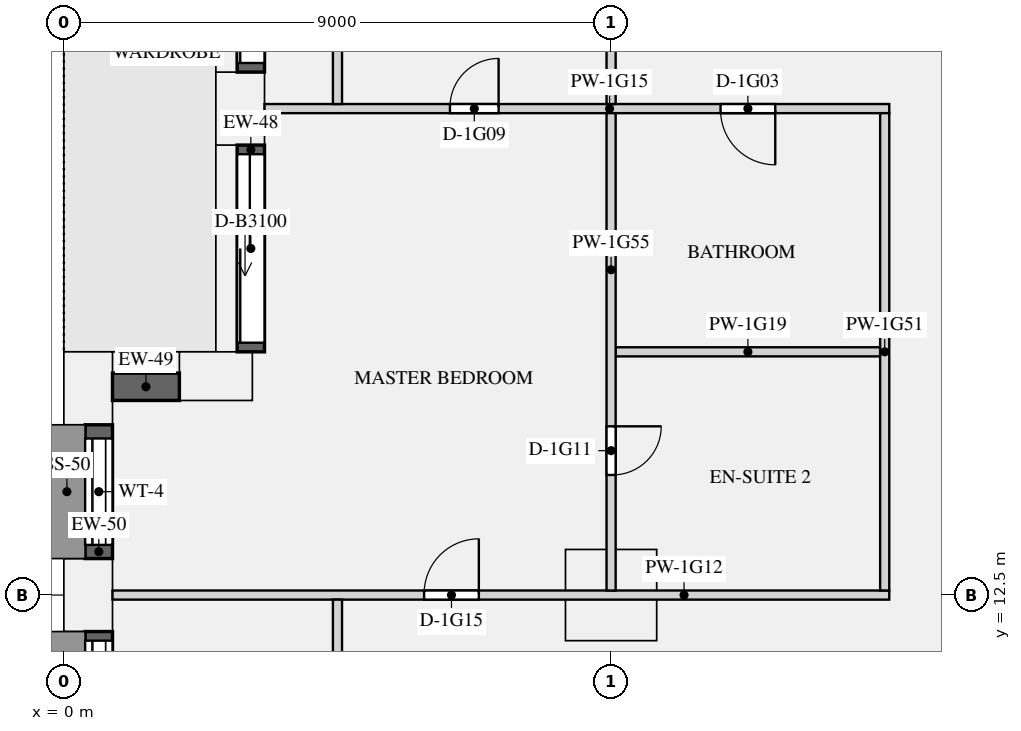
"""IFC4 building model, lengths in metres.
Left out: names, types, materials, properties, quantities, classifications, styles, units other than length and angle.
Written with IfcOpenShell. Run it as: python <this file> out.ifc"""

import sys

from ifc_helpers import new_model, si_unit, direction, frame, frame_2d, origin, origin_2d, place, context, subcontext, project, spatial, rectangle, extrude, element, fill, save


model = new_model("IFC4")
c1 = context("Model", 3, precision=1e-05, world=origin(), true_north=direction((0.0, 1.0)))
c2 = subcontext(c1, "Body", "Model", "MODEL_VIEW")
j1 = project(units=[si_unit("LENGTHUNIT", "METRE"), si_unit("PLANEANGLEUNIT", "RADIAN")], contexts=[c1])
p1 = place(None, origin())
s1 = spatial("IfcSite", under=j1, at=p1, CompositionType="ELEMENT")
p2 = place(p1, origin())
s2 = spatial("IfcBuilding", under=s1, at=p2, CompositionType="ELEMENT")
p3 = place(p2, frame((0.0, 0.0, 66.75)))
s3 = spatial("IfcBuildingStorey", under=s2, at=p3, CompositionType="ELEMENT", Elevation=66.75)
for number, where, z_axis, x_axis in (
    (1, (2.9, 20.5, 0.0), (0.0, 0.0, 1.0), (0.0, -1.0, 0.0)),
    (2, (2.5, 16.1, 0.0), (0.0, 0.0, 1.0), (-1.0, 0.0, 0.0)),
    (3, (0.4, 15.9, 0.0), (0.0, 0.0, 1.0), (0.0, -1.0, 0.0)),
    (4, (0.4, 12.5, 0.0), (0.0, 0.0, 1.0), (0.0, -1.0, 0.0)),
):
    element("IfcColumn", number, at=place(p3, frame(where, z_axis=z_axis, x_axis=x_axis)), inside=s3, PredefinedType="USERDEFINED", context=c2, shape_type="SweptSolid", body=[
        extrude(rectangle(XDim=1.2, YDim=0.8, at=origin_2d()), origin(), (0.0, 0.0, 1.0), 3.15),
    ])
p4 = place(p3, frame((9.0, 12.5, 0.0), z_axis=(0.0, 0.0, 1.0), x_axis=(1.0, 0.0, 0.0)))
e5 = element("IfcColumn", 5, at=p4, inside=s3, PredefinedType="COLUMN", context=c2, shape_type="SweptSolid", body=[
    extrude(rectangle(XDim=1.5, YDim=1.5, at=origin_2d()), origin(), (0.0, 0.0, 1.0), 3.15),
])
p5 = place(p3, frame((3.075, 23.9, 0.0), z_axis=(0.0, 0.0, 1.0), x_axis=(0.0, -1.0, 0.0)))
e6 = element("IfcWall", 6, at=p5, inside=s3, PredefinedType="SOLIDWALL", context=c2, shape_type="SweptSolid", body=[
    extrude(rectangle(XDim=2.8, YDim=0.45, at=frame_2d((1.4, 0.0))), origin(), (0.0, 0.0, 1.0), 2.83),
])
p6 = place(p5, frame((0.15, 0.0, 0.0)))
e7 = element("IfcOpeningElement", 7, at=p6, cuts=e6, PredefinedType="OPENING", context=c2, shape_type="SweptSolid", body=[
    extrude(rectangle(XDim=2.5, YDim=2.3, at=frame_2d((1.25, 1.15))), frame((0.0, 0.235, 0.0), z_axis=(0.0, -1.0, 0.0), x_axis=(1.0, 0.0, 0.0)), (0.0, 0.0, 1.0), 0.47),
])
p7 = place(p3, frame((3.075, 19.9, 0.0), z_axis=(0.0, 0.0, 1.0), x_axis=(0.0, -1.0, 0.0)))
e8 = element("IfcWall", 8, at=p7, inside=s3, PredefinedType="SOLIDWALL", context=c2, shape_type="SweptSolid", body=[
    extrude(rectangle(XDim=3.4, YDim=0.45, at=frame_2d((1.7, 0.0))), origin(), (0.0, 0.0, 1.0), 2.83),
])
p8 = place(p7, frame((0.15, 0.0, 0.0)))
e9 = element("IfcOpeningElement", 9, at=p8, cuts=e8, PredefinedType="OPENING", context=c2, shape_type="SweptSolid", body=[
    extrude(rectangle(XDim=3.1, YDim=2.3, at=frame_2d((1.55, 1.15))), frame((0.0, 0.235, 0.0), z_axis=(0.0, -1.0, 0.0), x_axis=(1.0, 0.0, 0.0)), (0.0, 0.0, 1.0), 0.47),
])
p9 = place(p3, frame((1.9, 15.925, 0.9), z_axis=(0.0, 0.0, 1.0), x_axis=(-1.0, 0.0, 0.0)))
e10 = element("IfcWall", 10, at=p9, inside=s3, PredefinedType="SOLIDWALL", context=c2, shape_type="SweptSolid", body=[
    extrude(rectangle(XDim=1.1, YDim=0.45, at=frame_2d((0.55, 0.0))), origin(), (0.0, 0.0, 1.0), 1.93),
])
p10 = place(p3, frame((0.575, 15.3, 0.9), z_axis=(0.0, 0.0, 1.0), x_axis=(0.0, -1.0, 0.0)))
e11 = element("IfcWall", 11, at=p10, inside=s3, PredefinedType="SOLIDWALL", context=c2, shape_type="SweptSolid", body=[
    extrude(rectangle(XDim=2.2, YDim=0.45, at=frame_2d((1.1, 0.0))), origin(), (0.0, 0.0, 1.0), 1.93),
])
p11 = place(p10, frame((0.225, 0.0, 0.15)))
e12 = element("IfcOpeningElement", 12, at=p11, cuts=e11, PredefinedType="OPENING", context=c2, shape_type="SweptSolid", body=[
    extrude(rectangle(XDim=1.75, YDim=1.5, at=frame_2d((0.875, 0.75))), frame((0.0, 0.235, 0.0), z_axis=(0.0, -1.0, 0.0), x_axis=(1.0, 0.0, 0.0)), (0.0, 0.0, 1.0), 0.47),
])
p12 = place(p3, frame((0.575, 11.9, 0.9), z_axis=(0.0, 0.0, 1.0), x_axis=(0.0, -1.0, 0.0)))
e13 = element("IfcWall", 13, at=p12, inside=s3, PredefinedType="SOLIDWALL", context=c2, shape_type="SweptSolid", body=[
    extrude(rectangle(XDim=2.8, YDim=0.45, at=frame_2d((1.4, 0.0))), origin(), (0.0, 0.0, 1.0), 1.93),
])
p13 = place(p12, frame((0.15, 0.0, 0.15)))
e14 = element("IfcOpeningElement", 14, at=p13, cuts=e13, PredefinedType="OPENING", context=c2, shape_type="SweptSolid", body=[
    extrude(rectangle(XDim=2.5, YDim=1.5, at=frame_2d((1.25, 0.75))), frame((0.0, 0.235, 0.0), z_axis=(0.0, -1.0, 0.0), x_axis=(1.0, 0.0, 0.0)), (0.0, 0.0, 1.0), 0.47),
])
p14 = place(p3, frame((0.8, 12.5, 0.0), z_axis=(0.0, 0.0, 1.0), x_axis=(1.0, 0.0, 0.0)))
e15 = element("IfcWall", 15, at=p14, inside=s3, PredefinedType="PARTITIONING", context=c2, shape_type="SweptSolid", body=[
    extrude(rectangle(XDim=12.775, YDim=0.15, at=frame_2d((6.387, 0.0))), origin(), (0.0, 0.0, 1.0), 2.83),
])
p15 = place(p14, frame((5.125, 0.0, 0.0)))
e16 = element("IfcOpeningElement", 16, at=p15, cuts=e15, PredefinedType="OPENING", context=c2, shape_type="SweptSolid", body=[
    extrude(rectangle(XDim=0.9, YDim=2.1, at=frame_2d((0.45, 1.05))), frame((0.0, 0.085, 0.0), z_axis=(0.0, -1.0, 0.0), x_axis=(1.0, 0.0, 0.0)), (0.0, 0.0, 1.0), 0.17),
])
p16 = place(p3, frame((3.3, 20.5, 0.0), z_axis=(0.0, 0.0, 1.0), x_axis=(1.0, 0.0, 0.0)))
e17 = element("IfcWall", 17, at=p16, inside=s3, PredefinedType="PARTITIONING", context=c2, shape_type="SweptSolid", body=[
    extrude(rectangle(XDim=10.275, YDim=0.15, at=frame_2d((5.137, 0.0))), origin(), (0.0, 0.0, 1.0), 2.83),
])
p17 = place(p16, frame((7.5, 0.0, 0.0)))
e18 = element("IfcOpeningElement", 18, at=p17, cuts=e17, PredefinedType="OPENING", context=c2, shape_type="SweptSolid", body=[
    extrude(rectangle(XDim=0.9, YDim=2.1, at=frame_2d((0.45, 1.05))), frame((0.0, 0.085, 0.0), z_axis=(0.0, -1.0, 0.0), x_axis=(1.0, 0.0, 0.0)), (0.0, 0.0, 1.0), 0.17),
])
p18 = place(p16, frame((3.05, 0.0, 0.0)))
e19 = element("IfcOpeningElement", 19, at=p18, cuts=e17, PredefinedType="OPENING", context=c2, shape_type="SweptSolid", body=[
    extrude(rectangle(XDim=0.8, YDim=2.1, at=frame_2d((0.4, 1.05))), frame((0.0, 0.085, 0.0), z_axis=(0.0, -1.0, 0.0), x_axis=(1.0, 0.0, 0.0)), (0.0, 0.0, 1.0), 0.17),
])
p19 = place(p3, frame((9.075, 16.5, 0.0), z_axis=(0.0, 0.0, 1.0), x_axis=(1.0, 0.0, 0.0)))
e20 = element("IfcWall", 20, at=p19, inside=s3, PredefinedType="PARTITIONING", context=c2, shape_type="SweptSolid", body=[
    extrude(rectangle(XDim=4.35, YDim=0.15, at=frame_2d((2.175, 0.0))), origin(), (0.0, 0.0, 1.0), 2.83),
])
p20 = place(p3, frame((13.5, 12.575, 0.0), z_axis=(0.0, 0.0, 1.0), x_axis=(0.0, 1.0, 0.0)))
e21 = element("IfcWall", 21, at=p20, inside=s3, PredefinedType="PARTITIONING", context=c2, shape_type="SweptSolid", body=[
    extrude(rectangle(XDim=7.85, YDim=0.15, at=frame_2d((3.925, 0.0))), origin(), (0.0, 0.0, 1.0), 2.83),
])
p21 = place(p3, frame((4.5, 5.3, 0.0), z_axis=(0.0, 0.0, 1.0), x_axis=(0.0, 1.0, 0.0)))
e22 = element("IfcWall", 22, at=p21, inside=s3, PredefinedType="PARTITIONING", context=c2, shape_type="SweptSolid", body=[
    extrude(rectangle(XDim=7.125, YDim=0.15, at=frame_2d((3.562, 0.0))), origin(), (0.0, 0.0, 1.0), 2.83),
])
p22 = place(p21, frame((4.75, 0.0, 0.0)))
e23 = element("IfcOpeningElement", 23, at=p22, cuts=e22, PredefinedType="OPENING", context=c2, shape_type="SweptSolid", body=[
    extrude(rectangle(XDim=0.9, YDim=2.1, at=frame_2d((0.45, 1.05))), frame((0.0, 0.085, 0.0), z_axis=(0.0, -1.0, 0.0), x_axis=(1.0, 0.0, 0.0)), (0.0, 0.0, 1.0), 0.17),
])
p23 = place(p21, frame((0.775, 0.0, 0.0)))
e24 = element("IfcOpeningElement", 24, at=p23, cuts=e22, PredefinedType="OPENING", context=c2, shape_type="SweptSolid", body=[
    extrude(rectangle(XDim=1.5, YDim=2.1, at=frame_2d((0.75, 1.05))), frame((0.0, 0.085, 0.0), z_axis=(0.0, -1.0, 0.0), x_axis=(1.0, 0.0, 0.0)), (0.0, 0.0, 1.0), 0.17),
])
p24 = place(p3, frame((4.5, 20.575, 0.0), z_axis=(0.0, 0.0, 1.0), x_axis=(0.0, 1.0, 0.0)))
e25 = element("IfcWall", 25, at=p24, inside=s3, PredefinedType="PARTITIONING", context=c2, shape_type="SweptSolid", body=[
    extrude(rectangle(XDim=3.35, YDim=0.15, at=frame_2d((1.675, 0.0))), origin(), (0.0, 0.0, 1.0), 2.83),
])
p25 = place(p24, frame((1.275, 0.0, 0.0)))
e26 = element("IfcOpeningElement", 26, at=p25, cuts=e25, PredefinedType="OPENING", context=c2, shape_type="SweptSolid", body=[
    extrude(rectangle(XDim=0.8, YDim=2.1, at=frame_2d((0.4, 1.05))), frame((0.0, 0.085, 0.0), z_axis=(0.0, -1.0, 0.0), x_axis=(1.0, 0.0, 0.0)), (0.0, 0.0, 1.0), 0.17),
])
p26 = place(p3, frame((9.0, 12.575, 0.0), z_axis=(0.0, 0.0, 1.0), x_axis=(0.0, 1.0, 0.0)))
e27 = element("IfcWall", 27, at=p26, inside=s3, PredefinedType="PARTITIONING", context=c2, shape_type="SweptSolid", body=[
    extrude(rectangle(XDim=7.85, YDim=0.15, at=frame_2d((3.925, 0.0))), origin(), (0.0, 0.0, 1.0), 2.83),
])
p27 = place(p26, frame((1.9, 0.0, 0.0)))
e28 = element("IfcOpeningElement", 28, at=p27, cuts=e27, PredefinedType="OPENING", context=c2, shape_type="SweptSolid", body=[
    extrude(rectangle(XDim=0.8, YDim=2.1, at=frame_2d((0.4, 1.05))), frame((0.0, 0.085, 0.0), z_axis=(0.0, -1.0, 0.0), x_axis=(1.0, 0.0, 0.0)), (0.0, 0.0, 1.0), 0.17),
])
p28 = place(p3, frame((9.0, 20.575, 0.0), z_axis=(0.0, 0.0, 1.0), x_axis=(0.0, 1.0, 0.0)))
e29 = element("IfcWall", 29, at=p28, inside=s3, PredefinedType="PARTITIONING", context=c2, shape_type="SweptSolid", body=[
    extrude(rectangle(XDim=11.725, YDim=0.15, at=frame_2d((5.863, 0.0))), origin(), (0.0, 0.0, 1.0), 2.83),
])
p29 = place(p28, frame((5.6, 0.0, 0.0)))
e30 = element("IfcOpeningElement", 30, at=p29, cuts=e29, PredefinedType="OPENING", context=c2, shape_type="SweptSolid", body=[
    extrude(rectangle(XDim=0.9, YDim=2.1, at=frame_2d((0.45, 1.05))), frame((0.0, 0.085, 0.0), z_axis=(0.0, -1.0, 0.0), x_axis=(1.0, 0.0, 0.0)), (0.0, 0.0, 1.0), 0.17),
])
p30 = place(p28, frame((9.413, 0.0, 0.0)))
e31 = element("IfcOpeningElement", 31, at=p30, cuts=e29, PredefinedType="OPENING", context=c2, shape_type="SweptSolid", body=[
    extrude(rectangle(XDim=0.9, YDim=2.1, at=frame_2d((0.45, 1.05))), frame((0.0, 0.085, 0.0), z_axis=(0.0, -1.0, 0.0), x_axis=(1.0, 0.0, 0.0)), (0.0, 0.0, 1.0), 0.17),
])
p31 = place(p6, origin())
e32 = element("IfcDoor", 32, at=p31, inside=s3, OperationType="SLIDING_TO_LEFT", PredefinedType="DOOR", context=c2, shape_type="SweptSolid", body=[
    extrude(rectangle(XDim=2.5, YDim=2.3, at=frame_2d((1.25, 1.15))), frame((0.0, -0.07, 0.0), z_axis=(0.0, -1.0, 0.0), x_axis=(1.0, 0.0, 0.0)), (0.0, 0.0, 1.0), 0.05),
])
fill(e7, e32)
p32 = place(p8, origin())
e33 = element("IfcDoor", 33, at=p32, inside=s3, OperationType="SLIDING_TO_LEFT", PredefinedType="DOOR", context=c2, shape_type="SweptSolid", body=[
    extrude(rectangle(XDim=3.1, YDim=2.3, at=frame_2d((1.55, 1.15))), frame((0.0, -0.07, 0.0), z_axis=(0.0, -1.0, 0.0), x_axis=(1.0, 0.0, 0.0)), (0.0, 0.0, 1.0), 0.05),
])
fill(e9, e33)
p33 = place(p11, origin())
e34 = element("IfcWindow", 34, at=p33, inside=s3, PartitioningType="SINGLE_PANEL", PredefinedType="WINDOW", context=c2, shape_type="SweptSolid", body=[
    extrude(rectangle(XDim=1.75, YDim=1.5, at=frame_2d((0.875, 0.75))), frame((0.0, -0.065, 0.0), z_axis=(0.0, -1.0, 0.0), x_axis=(1.0, 0.0, 0.0)), (0.0, 0.0, 1.0), 0.06),
])
fill(e12, e34)
p34 = place(p13, origin())
e35 = element("IfcWindow", 35, at=p34, inside=s3, PartitioningType="SINGLE_PANEL", PredefinedType="WINDOW", context=c2, shape_type="SweptSolid", body=[
    extrude(rectangle(XDim=2.5, YDim=1.5, at=frame_2d((1.25, 0.75))), frame((0.0, -0.065, 0.0), z_axis=(0.0, -1.0, 0.0), x_axis=(1.0, 0.0, 0.0)), (0.0, 0.0, 1.0), 0.06),
])
fill(e14, e35)
p35 = place(p17, frame((0.9, 0.0, 0.0), z_axis=(0.0, 0.0, 1.0), x_axis=(-1.0, 0.0, 0.0)))
e36 = element("IfcDoor", 36, at=p35, inside=s3, OperationType="SINGLE_SWING_LEFT", PredefinedType="DOOR", context=c2, shape_type="SweptSolid", body=[
    extrude(rectangle(XDim=0.9, YDim=2.1, at=frame_2d((0.45, 1.05))), frame((0.0, 0.025, 0.0), z_axis=(0.0, -1.0, 0.0), x_axis=(1.0, 0.0, 0.0)), (0.0, 0.0, 1.0), 0.05),
])
fill(e18, e36)
p36 = place(p18, origin())
e37 = element("IfcDoor", 37, at=p36, inside=s3, OperationType="SINGLE_SWING_RIGHT", PredefinedType="DOOR", context=c2, shape_type="SweptSolid", body=[
    extrude(rectangle(XDim=0.8, YDim=2.1, at=frame_2d((0.4, 1.05))), frame((0.0, 0.025, 0.0), z_axis=(0.0, -1.0, 0.0), x_axis=(1.0, 0.0, 0.0)), (0.0, 0.0, 1.0), 0.05),
])
fill(e19, e37)
p37 = place(p27, frame((0.8, 0.0, 0.0), z_axis=(0.0, 0.0, 1.0), x_axis=(-1.0, 0.0, 0.0)))
e38 = element("IfcDoor", 38, at=p37, inside=s3, OperationType="SINGLE_SWING_LEFT", PredefinedType="DOOR", context=c2, shape_type="SweptSolid", body=[
    extrude(rectangle(XDim=0.8, YDim=2.1, at=frame_2d((0.4, 1.05))), frame((0.0, 0.025, 0.0), z_axis=(0.0, -1.0, 0.0), x_axis=(1.0, 0.0, 0.0)), (0.0, 0.0, 1.0), 0.05),
])
fill(e28, e38)
p38 = place(p15, origin())
e39 = element("IfcDoor", 39, at=p38, inside=s3, OperationType="SINGLE_SWING_RIGHT", PredefinedType="DOOR", context=c2, shape_type="SweptSolid", body=[
    extrude(rectangle(XDim=0.9, YDim=2.1, at=frame_2d((0.45, 1.05))), frame((0.0, 0.025, 0.0), z_axis=(0.0, -1.0, 0.0), x_axis=(1.0, 0.0, 0.0)), (0.0, 0.0, 1.0), 0.05),
])
fill(e16, e39)
save(model, sys.argv[1])
